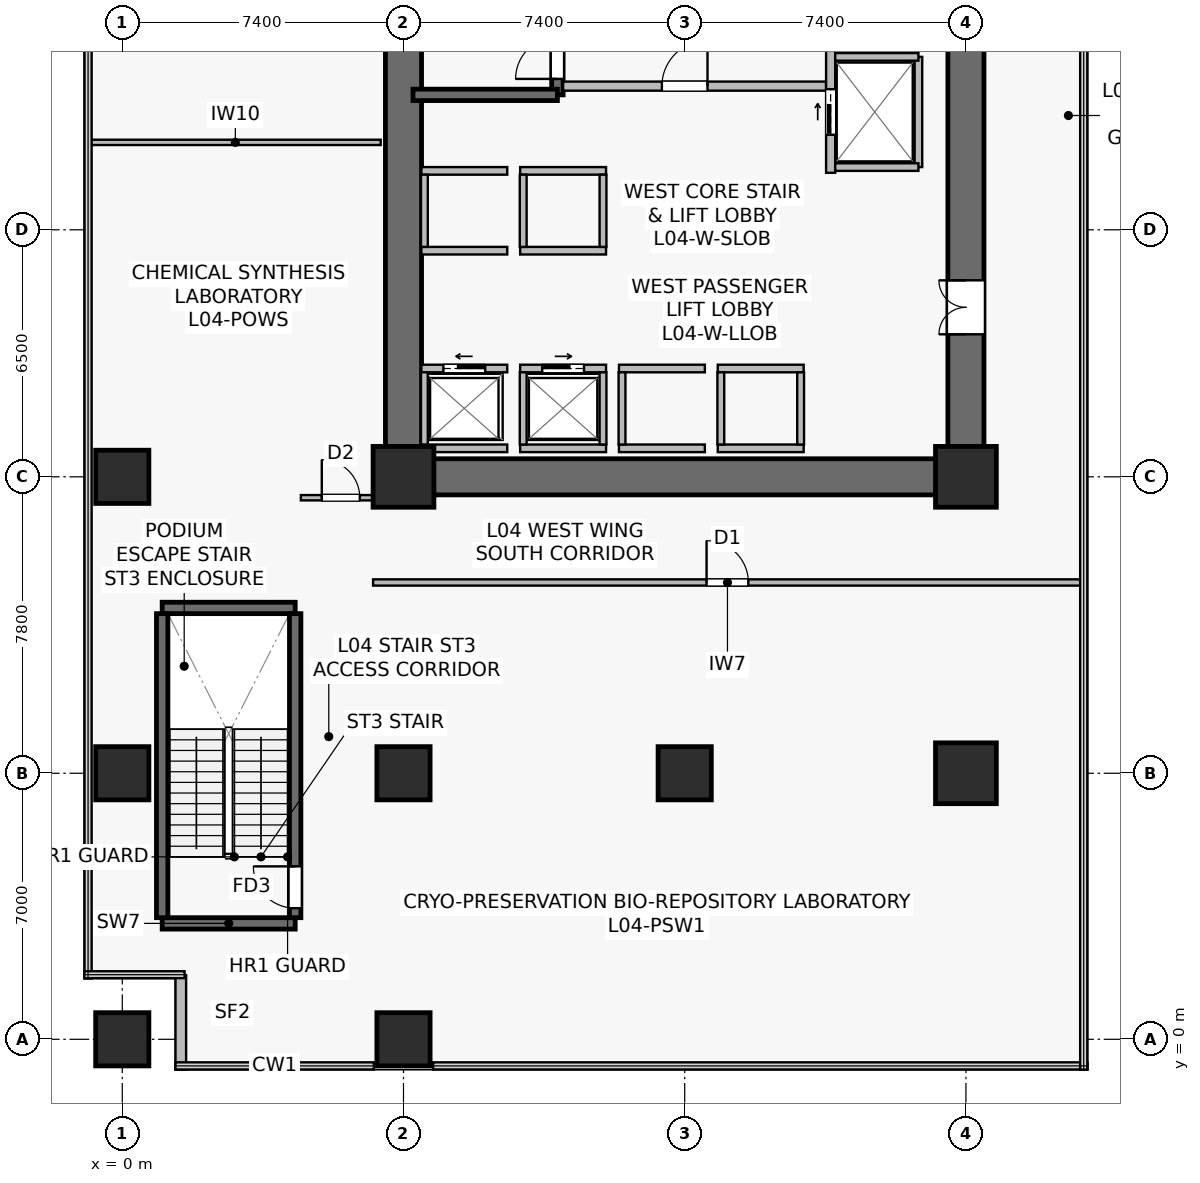
"""IFC4 building model, lengths in metres.
Left out: names, types, materials, properties, quantities, classifications, styles, units other than length and angle.
Written with IfcOpenShell. Run it as: python <this file> out.ifc"""

import sys

from ifc_helpers import new_model, si_unit, direction, frame, frame_2d, origin, origin_2d, place, context, subcontext, project, spatial, rectangle, extrude, source, transform, mapped, element, fill, save


model = new_model("IFC4")
c1 = context("Model", 3, precision=1e-05, world=origin(), true_north=direction((0.0, 1.0)))
c2 = subcontext(c1, "Body", "Model", "MODEL_VIEW")
j1 = project(units=[si_unit("LENGTHUNIT", "METRE"), si_unit("PLANEANGLEUNIT", "RADIAN")], contexts=[c1])
p1 = place(None, origin())
s1 = spatial("IfcSite", under=j1, at=p1, CompositionType="ELEMENT")
p2 = place(p1, origin())
s2 = spatial("IfcBuilding", under=s1, at=p2, CompositionType="ELEMENT")
p3 = place(p2, frame((0.0, 0.0, 15.0)))
s3 = spatial("IfcBuildingStorey", under=s2, at=p3, CompositionType="ELEMENT", Elevation=15.0)
p4 = place(p3, frame((6.925, 14.8, 0.0), z_axis=(0.0, 0.0, 1.0), x_axis=(1.0, 0.0, 0.0)))
e1 = element("IfcWall", 1, at=p4, inside=s3, PredefinedType="SHEAR", context=c2, shape_type="SweptSolid", body=[
    extrude(rectangle(XDim=15.75, YDim=0.95, at=frame_2d((7.875, 0.0))), origin(), (0.0, 0.0, 1.0), 4.45),
])
p5 = place(p3, frame((7.4, 15.275, 0.0), z_axis=(0.0, 0.0, 1.0), x_axis=(0.0, 1.0, 0.0)))
e2 = element("IfcWall", 2, at=p5, inside=s3, PredefinedType="SHEAR", context=c2, shape_type="SweptSolid", body=[
    extrude(rectangle(XDim=18.05, YDim=0.95, at=frame_2d((9.025, 0.0))), origin(), (0.0, 0.0, 1.0), 4.45),
])
p6 = place(p3, frame((22.2, 15.275, 0.0), z_axis=(0.0, 0.0, 1.0), x_axis=(0.0, 1.0, 0.0)))
e3 = element("IfcWall", 3, at=p6, inside=s3, PredefinedType="SHEAR", context=c2, shape_type="SweptSolid", body=[
    extrude(rectangle(XDim=18.05, YDim=0.95, at=frame_2d((9.025, 0.0))), origin(), (0.0, 0.0, 1.0), 4.45),
])
p7 = place(p6, frame((3.275, 0.0, 0.0)))
e4 = element("IfcOpeningElement", 4, at=p7, cuts=e3, PredefinedType="OPENING", context=c2, shape_type="SweptSolid", body=[
    extrude(rectangle(XDim=1.42, YDim=2.2, at=frame_2d((0.71, 1.1))), frame((0.0, 0.485, 0.0), z_axis=(0.0, -1.0, 0.0), x_axis=(1.0, 0.0, 0.0)), (0.0, 0.0, 1.0), 0.97),
])
p8 = place(p3, frame((11.45, 24.85, 0.0), z_axis=(0.0, 0.0, 1.0), x_axis=(0.0, 1.0, 0.0)))
e5 = element("IfcWall", 5, at=p8, inside=s3, PredefinedType="SHEAR", context=c2, shape_type="SweptSolid", body=[
    extrude(rectangle(XDim=8.63, YDim=0.3, at=frame_2d((4.315, 0.0))), origin(), (0.0, 0.0, 1.0), 4.45),
])
p9 = place(p8, frame((0.42, 0.0, 0.0)))
e6 = element("IfcOpeningElement", 6, at=p9, cuts=e5, PredefinedType="OPENING", context=c2, shape_type="SweptSolid", body=[
    extrude(rectangle(XDim=1.1, YDim=2.15, at=frame_2d((0.55, 1.075))), frame((0.0, 0.16, 0.0), z_axis=(0.0, -1.0, 0.0), x_axis=(1.0, 0.0, 0.0)), (0.0, 0.0, 1.0), 0.32),
])
p10 = place(p3, frame((7.65, 24.85, 0.0), z_axis=(0.0, 0.0, 1.0), x_axis=(1.0, 0.0, 0.0)))
e7 = element("IfcWall", 7, at=p10, inside=s3, PredefinedType="SHEAR", context=c2, shape_type="SweptSolid", body=[
    extrude(rectangle(XDim=3.8, YDim=0.3, at=frame_2d((1.9, 0.0))), origin(), (0.0, 0.0, 1.0), 4.45),
])
for number, where, z_axis, x_axis in (
    (8, (1.05, 3.05, 0.0), (0.0, 0.0, 1.0), (1.0, 0.0, 0.0)),
    (9, (1.05, 11.35, 0.0), (0.0, 0.0, 1.0), (1.0, 0.0, 0.0)),
):
    element("IfcWall", number, at=place(p3, frame(where, z_axis=z_axis, x_axis=x_axis)), inside=s3, PredefinedType="SHEAR", context=c2, shape_type="SweptSolid", body=[
        extrude(rectangle(XDim=3.5, YDim=0.3, at=frame_2d((1.75, 0.0))), origin(), (0.0, 0.0, 1.0), 4.45),
    ])
p11 = place(p3, frame((1.05, 3.2, 0.0), z_axis=(0.0, 0.0, 1.0), x_axis=(0.0, 1.0, 0.0)))
e10 = element("IfcWall", 10, at=p11, inside=s3, PredefinedType="SHEAR", context=c2, shape_type="SweptSolid", body=[
    extrude(rectangle(XDim=8.0, YDim=0.3, at=frame_2d((4.0, 0.0))), origin(), (0.0, 0.0, 1.0), 4.45),
])
p12 = place(p3, frame((4.55, 3.2, 0.0), z_axis=(0.0, 0.0, 1.0), x_axis=(0.0, 1.0, 0.0)))
e11 = element("IfcWall", 11, at=p12, inside=s3, PredefinedType="SHEAR", context=c2, shape_type="SweptSolid", body=[
    extrude(rectangle(XDim=8.0, YDim=0.3, at=frame_2d((4.0, 0.0))), origin(), (0.0, 0.0, 1.0), 4.45),
])
p13 = place(p12, frame((0.25, 0.0, 0.0)))
e12 = element("IfcOpeningElement", 12, at=p13, cuts=e11, PredefinedType="OPENING", context=c2, shape_type="SweptSolid", body=[
    extrude(rectangle(XDim=1.1, YDim=2.15, at=frame_2d((0.55, 1.075))), frame((0.0, 0.16, 0.0), z_axis=(0.0, -1.0, 0.0), x_axis=(1.0, 0.0, 0.0)), (0.0, 0.0, 1.0), 0.32),
])
m1 = source(origin(), c2, "Body", "SweptSolid", [
    extrude(rectangle(XDim=1.4, YDim=1.4, at=origin_2d()), origin(), (0.0, 0.0, 1.0), 4.8),
])
p14 = place(p3, frame((14.8, 7.0, 0.0), z_axis=(0.0, 0.0, 1.0), x_axis=(1.0, 0.0, 0.0)))
e13 = element("IfcColumn", 13, at=p14, inside=s3, PredefinedType="COLUMN", context=c2, shape_type="MappedRepresentation", body=[
    mapped(m1, transform((0.0, 0.0, 0.0), scale=1.0)),
])
m2 = source(origin(), c2, "Body", "SweptSolid", [
    extrude(rectangle(XDim=1.6, YDim=1.6, at=origin_2d()), origin(), (0.0, 0.0, 1.0), 4.8),
])
for number, where, z_axis, x_axis in (
    (14, (22.2, 7.0, 0.0), (0.0, 0.0, 1.0), (1.0, 0.0, 0.0)),
    (15, (7.4, 14.8, 0.0), (0.0, 0.0, 1.0), (1.0, 0.0, 0.0)),
    (16, (22.2, 14.8, 0.0), (0.0, 0.0, 1.0), (1.0, 0.0, 0.0)),
):
    element("IfcColumn", number, at=place(p3, frame(where, z_axis=z_axis, x_axis=x_axis)), inside=s3, PredefinedType="COLUMN", context=c2, shape_type="MappedRepresentation", body=[
        mapped(m2, transform((0.0, 0.0, 0.0), scale=1.0)),
    ])
for number, where, z_axis, x_axis in (
    (17, (7.4, 7.0, 0.0), (0.0, 0.0, 1.0), (1.0, 0.0, 0.0)),
    (18, (0.0, 7.0, 0.0), (0.0, 0.0, 1.0), (1.0, 0.0, 0.0)),
    (19, (0.0, 14.8, 0.0), (0.0, 0.0, 1.0), (1.0, 0.0, 0.0)),
    (20, (0.0, 0.0, 0.0), (0.0, 0.0, 1.0), (1.0, 0.0, 0.0)),
    (21, (7.4, 0.0, 0.0), (0.0, 0.0, 1.0), (1.0, 0.0, 0.0)),
):
    element("IfcColumn", number, at=place(p3, frame(where, z_axis=z_axis, x_axis=x_axis)), inside=s3, PredefinedType="COLUMN", context=c2, shape_type="MappedRepresentation", body=[
        mapped(m1, transform((0.0, 0.0, 0.0), scale=1.0)),
    ])
p15 = place(p3, frame((1.54, 1.688, 0.0), z_axis=(0.0, 0.0, 1.0), x_axis=(0.0, -1.0, 0.0)))
e22 = element("IfcWall", 22, at=p15, inside=s3, PredefinedType="STANDARD", context=c2, shape_type="SweptSolid", body=[
    extrude(rectangle(XDim=2.488, YDim=0.28, at=frame_2d((1.244, 0.0))), origin(), (0.0, 0.0, 1.0), 4.45),
])
p16 = place(p3, frame((11.6, 25.08, 0.0), z_axis=(0.0, 0.0, 1.0), x_axis=(1.0, 0.0, 0.0)))
e23 = element("IfcWall", 23, at=p16, inside=s3, PredefinedType="SOLIDWALL", context=c2, shape_type="SweptSolid", body=[
    extrude(rectangle(XDim=6.92, YDim=0.24, at=frame_2d((3.46, 0.0))), origin(), (0.0, 0.0, 1.0), 3.735),
])
p17 = place(p16, frame((2.6, 0.0, 0.0)))
e24 = element("IfcOpeningElement", 24, at=p17, cuts=e23, PredefinedType="OPENING", context=c2, shape_type="SweptSolid", body=[
    extrude(rectangle(XDim=1.2, YDim=2.16, at=frame_2d((0.6, 1.08))), frame((0.0, 0.13, 0.0), z_axis=(0.0, -1.0, 0.0), x_axis=(1.0, 0.0, 0.0)), (0.0, 0.0, 1.0), 0.26),
])
p18 = place(p3, frame((18.64, 22.8, 0.0), z_axis=(0.0, 0.0, 1.0), x_axis=(0.0, 1.0, 0.0)))
e25 = element("IfcWall", 25, at=p18, inside=s3, PredefinedType="SOLIDWALL", context=c2, shape_type="SweptSolid", body=[
    extrude(rectangle(XDim=6.85, YDim=0.24, at=frame_2d((3.425, 0.0))), origin(), (0.0, 0.0, 1.0), 3.535),
])
p19 = place(p18, frame((4.85, 0.0, 0.0)))
e26 = element("IfcOpeningElement", 26, at=p19, cuts=e25, PredefinedType="OPENING", context=c2, shape_type="SweptSolid", body=[
    extrude(rectangle(XDim=1.1, YDim=2.22, at=frame_2d((0.55, 1.11))), frame((0.0, 0.13, 0.0), z_axis=(0.0, -1.0, 0.0), x_axis=(1.0, 0.0, 0.0)), (0.0, 0.0, 1.0), 0.26),
])
p20 = place(p18, frame((1.0, 0.0, 0.0)))
e27 = element("IfcOpeningElement", 27, at=p20, cuts=e25, PredefinedType="OPENING", context=c2, shape_type="SweptSolid", body=[
    extrude(rectangle(XDim=1.2, YDim=2.22, at=frame_2d((0.6, 1.11))), frame((0.0, 0.13, 0.0), z_axis=(0.0, -1.0, 0.0), x_axis=(1.0, 0.0, 0.0)), (0.0, 0.0, 1.0), 0.26),
])
p21 = place(p3, frame((7.87, 17.65, 0.0), z_axis=(0.0, 0.0, 1.0), x_axis=(1.0, 0.0, 0.0)))
e28 = element("IfcWall", 28, at=p21, inside=s3, PredefinedType="SOLIDWALL", context=c2, shape_type="SweptSolid", body=[
    extrude(rectangle(XDim=2.26, YDim=0.2, at=frame_2d((1.13, 0.0))), origin(), (0.0, 0.0, 1.0), 4.45),
])
p22 = place(p21, frame((0.58, 0.0, 0.0)))
e29 = element("IfcOpeningElement", 29, at=p22, cuts=e28, PredefinedType="OPENING", context=c2, shape_type="SweptSolid", body=[
    extrude(rectangle(XDim=1.1, YDim=2.22, at=frame_2d((0.55, 1.11))), frame((0.0, 0.11, 0.0), z_axis=(0.0, -1.0, 0.0), x_axis=(1.0, 0.0, 0.0)), (0.0, 0.0, 1.0), 0.22),
])
p23 = place(p3, frame((7.87, 15.55, 0.0), z_axis=(0.0, 0.0, 1.0), x_axis=(1.0, 0.0, 0.0)))
e30 = element("IfcWall", 30, at=p23, inside=s3, PredefinedType="SOLIDWALL", context=c2, shape_type="SweptSolid", body=[
    extrude(rectangle(XDim=2.26, YDim=0.2, at=frame_2d((1.13, 0.0))), origin(), (0.0, 0.0, 1.0), 4.45),
])
p24 = place(p3, frame((7.95, 15.65, 0.0), z_axis=(0.0, 0.0, 1.0), x_axis=(0.0, 1.0, 0.0)))
e31 = element("IfcWall", 31, at=p24, inside=s3, PredefinedType="SOLIDWALL", context=c2, shape_type="SweptSolid", body=[
    extrude(rectangle(XDim=1.9, YDim=0.18, at=frame_2d((0.95, 0.0))), origin(), (0.0, 0.0, 1.0), 4.45),
])
p25 = place(p3, frame((10.47, 17.65, 0.0), z_axis=(0.0, 0.0, 1.0), x_axis=(1.0, 0.0, 0.0)))
e32 = element("IfcWall", 32, at=p25, inside=s3, PredefinedType="SOLIDWALL", context=c2, shape_type="SweptSolid", body=[
    extrude(rectangle(XDim=2.26, YDim=0.2, at=frame_2d((1.13, 0.0))), origin(), (0.0, 0.0, 1.0), 4.45),
])
p26 = place(p25, frame((0.58, 0.0, 0.0)))
e33 = element("IfcOpeningElement", 33, at=p26, cuts=e32, PredefinedType="OPENING", context=c2, shape_type="SweptSolid", body=[
    extrude(rectangle(XDim=1.1, YDim=2.22, at=frame_2d((0.55, 1.11))), frame((0.0, 0.11, 0.0), z_axis=(0.0, -1.0, 0.0), x_axis=(1.0, 0.0, 0.0)), (0.0, 0.0, 1.0), 0.22),
])
p27 = place(p3, frame((10.47, 15.55, 0.0), z_axis=(0.0, 0.0, 1.0), x_axis=(1.0, 0.0, 0.0)))
e34 = element("IfcWall", 34, at=p27, inside=s3, PredefinedType="SOLIDWALL", context=c2, shape_type="SweptSolid", body=[
    extrude(rectangle(XDim=2.26, YDim=0.2, at=frame_2d((1.13, 0.0))), origin(), (0.0, 0.0, 1.0), 4.45),
])
for number, where, z_axis, x_axis in (
    (35, (10.55, 15.65, 0.0), (0.0, 0.0, 1.0), (0.0, 1.0, 0.0)),
    (36, (12.65, 15.65, 0.0), (0.0, 0.0, 1.0), (0.0, 1.0, 0.0)),
):
    element("IfcWall", number, at=place(p3, frame(where, z_axis=z_axis, x_axis=x_axis)), inside=s3, PredefinedType="SOLIDWALL", context=c2, shape_type="SweptSolid", body=[
        extrude(rectangle(XDim=1.9, YDim=0.18, at=frame_2d((0.95, 0.0))), origin(), (0.0, 0.0, 1.0), 4.45),
    ])
for number, where, z_axis, x_axis in (
    (37, (13.07, 17.65, 0.0), (0.0, 0.0, 1.0), (1.0, 0.0, 0.0)),
    (38, (13.07, 15.55, 0.0), (0.0, 0.0, 1.0), (1.0, 0.0, 0.0)),
):
    element("IfcWall", number, at=place(p3, frame(where, z_axis=z_axis, x_axis=x_axis)), inside=s3, PredefinedType="SOLIDWALL", context=c2, shape_type="SweptSolid", body=[
        extrude(rectangle(XDim=2.26, YDim=0.2, at=frame_2d((1.13, 0.0))), origin(), (0.0, 0.0, 1.0), 3.735),
    ])
p28 = place(p3, frame((13.15, 15.65, 0.0), z_axis=(0.0, 0.0, 1.0), x_axis=(0.0, 1.0, 0.0)))
e39 = element("IfcWall", 39, at=p28, inside=s3, PredefinedType="SOLIDWALL", context=c2, shape_type="SweptSolid", body=[
    extrude(rectangle(XDim=1.9, YDim=0.18, at=frame_2d((0.95, 0.0))), origin(), (0.0, 0.0, 1.0), 4.45),
])
for number, where, z_axis, x_axis in (
    (40, (15.67, 17.65, 0.0), (0.0, 0.0, 1.0), (1.0, 0.0, 0.0)),
    (41, (15.67, 15.55, 0.0), (0.0, 0.0, 1.0), (1.0, 0.0, 0.0)),
):
    element("IfcWall", number, at=place(p3, frame(where, z_axis=z_axis, x_axis=x_axis)), inside=s3, PredefinedType="SOLIDWALL", context=c2, shape_type="SweptSolid", body=[
        extrude(rectangle(XDim=2.26, YDim=0.2, at=frame_2d((1.13, 0.0))), origin(), (0.0, 0.0, 1.0), 4.45),
    ])
for number, where, z_axis, x_axis in (
    (42, (15.75, 15.65, 0.0), (0.0, 0.0, 1.0), (0.0, 1.0, 0.0)),
    (43, (17.85, 15.65, 0.0), (0.0, 0.0, 1.0), (0.0, 1.0, 0.0)),
):
    element("IfcWall", number, at=place(p3, frame(where, z_axis=z_axis, x_axis=x_axis)), inside=s3, PredefinedType="SOLIDWALL", context=c2, shape_type="SweptSolid", body=[
        extrude(rectangle(XDim=1.9, YDim=0.18, at=frame_2d((0.95, 0.0))), origin(), (0.0, 0.0, 1.0), 4.45),
    ])
for number, where, z_axis, x_axis in (
    (44, (7.87, 20.75, 0.0), (0.0, 0.0, 1.0), (1.0, 0.0, 0.0)),
    (45, (7.87, 22.85, 0.0), (0.0, 0.0, 1.0), (1.0, 0.0, 0.0)),
):
    element("IfcWall", number, at=place(p3, frame(where, z_axis=z_axis, x_axis=x_axis)), inside=s3, PredefinedType="SOLIDWALL", context=c2, shape_type="SweptSolid", body=[
        extrude(rectangle(XDim=2.26, YDim=0.2, at=frame_2d((1.13, 0.0))), origin(), (0.0, 0.0, 1.0), 4.45),
    ])
p29 = place(p3, frame((7.95, 20.85, 0.0), z_axis=(0.0, 0.0, 1.0), x_axis=(0.0, 1.0, 0.0)))
e46 = element("IfcWall", 46, at=p29, inside=s3, PredefinedType="SOLIDWALL", context=c2, shape_type="SweptSolid", body=[
    extrude(rectangle(XDim=1.9, YDim=0.18, at=frame_2d((0.95, 0.0))), origin(), (0.0, 0.0, 1.0), 4.45),
])
for number, where, z_axis, x_axis in (
    (47, (10.47, 20.75, 0.0), (0.0, 0.0, 1.0), (1.0, 0.0, 0.0)),
    (48, (10.47, 22.85, 0.0), (0.0, 0.0, 1.0), (1.0, 0.0, 0.0)),
):
    element("IfcWall", number, at=place(p3, frame(where, z_axis=z_axis, x_axis=x_axis)), inside=s3, PredefinedType="SOLIDWALL", context=c2, shape_type="SweptSolid", body=[
        extrude(rectangle(XDim=2.26, YDim=0.2, at=frame_2d((1.13, 0.0))), origin(), (0.0, 0.0, 1.0), 4.45),
    ])
for number, where, z_axis, x_axis in (
    (49, (10.55, 20.85, 0.0), (0.0, 0.0, 1.0), (0.0, 1.0, 0.0)),
    (50, (12.65, 20.85, 0.0), (0.0, 0.0, 1.0), (0.0, 1.0, 0.0)),
):
    element("IfcWall", number, at=place(p3, frame(where, z_axis=z_axis, x_axis=x_axis)), inside=s3, PredefinedType="SOLIDWALL", context=c2, shape_type="SweptSolid", body=[
        extrude(rectangle(XDim=1.9, YDim=0.18, at=frame_2d((0.95, 0.0))), origin(), (0.0, 0.0, 1.0), 4.45),
    ])
p30 = place(p3, frame((20.95, 22.95, 0.0), z_axis=(0.0, 0.0, 1.0), x_axis=(0.0, 1.0, 0.0)))
e51 = element("IfcWall", 51, at=p30, inside=s3, PredefinedType="SOLIDWALL", context=c2, shape_type="SweptSolid", body=[
    extrude(rectangle(XDim=2.9, YDim=0.2, at=frame_2d((1.45, 0.0))), origin(), (0.0, 0.0, 1.0), 3.535),
])
for number, where, z_axis, x_axis in (
    (52, (18.76, 25.85, 0.0), (0.0, 0.0, 1.0), (1.0, 0.0, 0.0)),
    (53, (18.76, 22.95, 0.0), (0.0, 0.0, 1.0), (1.0, 0.0, 0.0)),
):
    element("IfcWall", number, at=place(p3, frame(where, z_axis=z_axis, x_axis=x_axis)), inside=s3, PredefinedType="SOLIDWALL", context=c2, shape_type="SweptSolid", body=[
        extrude(rectangle(XDim=2.19, YDim=0.2, at=frame_2d((1.095, 0.0))), origin(), (0.0, 0.0, 1.0), 4.45),
    ])
p31 = place(p3, frame((-0.85, 23.6, 0.0), z_axis=(0.0, 0.0, 1.0), x_axis=(1.0, 0.0, 0.0)))
e54 = element("IfcWall", 54, at=p31, inside=s3, PredefinedType="PARTITIONING", context=c2, shape_type="SweptSolid", body=[
    extrude(rectangle(XDim=7.65, YDim=0.14, at=frame_2d((3.825, 0.0))), origin(), (0.0, 0.0, 1.0), 3.835),
])
p32 = place(p3, frame((4.7, 14.25, 0.0), z_axis=(0.0, 0.0, 1.0), x_axis=(1.0, 0.0, 0.0)))
e55 = element("IfcWall", 55, at=p32, inside=s3, PredefinedType="PARTITIONING", context=c2, shape_type="SweptSolid", body=[
    extrude(rectangle(XDim=2.1, YDim=0.14, at=frame_2d((1.05, 0.0))), origin(), (0.0, 0.0, 1.0), 4.45),
])
p33 = place(p32, frame((0.55, 0.0, 0.0)))
e56 = element("IfcOpeningElement", 56, at=p33, cuts=e55, PredefinedType="OPENING", context=c2, shape_type="SweptSolid", body=[
    extrude(rectangle(XDim=1.0, YDim=2.15, at=frame_2d((0.5, 1.075))), frame((0.0, 0.08, 0.0), z_axis=(0.0, -1.0, 0.0), x_axis=(1.0, 0.0, 0.0)), (0.0, 0.0, 1.0), 0.16),
])
p34 = place(p3, frame((6.6, 12.02, 0.0), z_axis=(0.0, 0.0, 1.0), x_axis=(1.0, 0.0, 0.0)))
e57 = element("IfcWall", 57, at=p34, inside=s3, PredefinedType="PARTITIONING", context=c2, shape_type="SweptSolid", body=[
    extrude(rectangle(XDim=18.65, YDim=0.165, at=frame_2d((9.325, 0.0))), origin(), (0.0, 0.0, 1.0), 3.735),
])
p35 = place(p34, frame((8.775, 0.0, 0.0)))
e58 = element("IfcOpeningElement", 58, at=p35, cuts=e57, PredefinedType="OPENING", context=c2, shape_type="SweptSolid", body=[
    extrude(rectangle(XDim=1.1, YDim=2.18, at=frame_2d((0.55, 1.09))), frame((0.0, 0.093, 0.0), z_axis=(0.0, -1.0, 0.0), x_axis=(1.0, 0.0, 0.0)), (0.0, 0.0, 1.0), 0.185),
])
m3 = source(origin(), c2, "Body", "SweptSolid", [
    extrude(rectangle(XDim=1.1, YDim=2.15, at=frame_2d((0.55, 1.075))), frame((0.0, 0.025, 0.0), z_axis=(0.0, -1.0, 0.0), x_axis=(1.0, 0.0, 0.0)), (0.0, 0.0, 1.0), 0.05),
])
p36 = place(p9, origin())
e59 = element("IfcDoor", 59, at=p36, inside=s3, OperationType="SINGLE_SWING_LEFT", PredefinedType="DOOR", context=c2, shape_type="MappedRepresentation", body=[
    mapped(m3, transform((0.0, 0.0, 0.0), scale=1.0)),
])
fill(e6, e59)
m4 = source(origin(), c2, "Body", "SweptSolid", [
    extrude(rectangle(XDim=1.2, YDim=2.16, at=frame_2d((0.6, 1.08))), frame((0.0, 0.025, 0.0), z_axis=(0.0, -1.0, 0.0), x_axis=(1.0, 0.0, 0.0)), (0.0, 0.0, 1.0), 0.05),
])
p37 = place(p17, origin())
e60 = element("IfcDoor", 60, at=p37, inside=s3, OperationType="SINGLE_SWING_RIGHT", PredefinedType="DOOR", context=c2, shape_type="MappedRepresentation", body=[
    mapped(m4, transform((0.0, 0.0, 0.0), scale=1.0)),
])
fill(e24, e60)
m5 = source(origin(), c2, "Body", "SweptSolid", [
    extrude(rectangle(XDim=1.1, YDim=2.22, at=frame_2d((0.55, 1.11))), frame((0.0, 0.025, 0.0), z_axis=(0.0, -1.0, 0.0), x_axis=(1.0, 0.0, 0.0)), (0.0, 0.0, 1.0), 0.05),
])
p38 = place(p22, origin())
e61 = element("IfcDoor", 61, at=p38, inside=s3, OperationType="SLIDING_TO_LEFT", PredefinedType="USERDEFINED", context=c2, shape_type="MappedRepresentation", body=[
    mapped(m5, transform((0.0, 0.0, 0.0), scale=1.0)),
])
fill(e29, e61)
p39 = place(p26, origin())
e62 = element("IfcDoor", 62, at=p39, inside=s3, OperationType="SLIDING_TO_RIGHT", PredefinedType="USERDEFINED", context=c2, shape_type="MappedRepresentation", body=[
    mapped(m5, transform((0.0, 0.0, 0.0), scale=1.0)),
])
fill(e33, e62)
m6 = source(origin(), c2, "Body", "SweptSolid", [
    extrude(rectangle(XDim=1.2, YDim=2.22, at=frame_2d((0.6, 1.11))), frame((0.0, 0.025, 0.0), z_axis=(0.0, -1.0, 0.0), x_axis=(1.0, 0.0, 0.0)), (0.0, 0.0, 1.0), 0.05),
])
p40 = place(p20, origin())
e63 = element("IfcDoor", 63, at=p40, inside=s3, OperationType="SLIDING_TO_RIGHT", PredefinedType="USERDEFINED", context=c2, shape_type="MappedRepresentation", body=[
    mapped(m6, transform((0.0, 0.0, 0.0), scale=1.0)),
])
fill(e27, e63)
m7 = source(origin(), c2, "Body", "SweptSolid", [
    extrude(rectangle(XDim=1.42, YDim=2.2, at=frame_2d((0.71, 1.1))), frame((0.0, 0.025, 0.0), z_axis=(0.0, -1.0, 0.0), x_axis=(1.0, 0.0, 0.0)), (0.0, 0.0, 1.0), 0.05),
])
p41 = place(p7, origin())
e64 = element("IfcDoor", 64, at=p41, inside=s3, OperationType="DOUBLE_DOOR_SINGLE_SWING", PredefinedType="DOOR", context=c2, shape_type="MappedRepresentation", body=[
    mapped(m7, transform((0.0, 0.0, 0.0), scale=1.0)),
])
fill(e4, e64)
p42 = place(p13, origin())
e65 = element("IfcDoor", 65, at=p42, inside=s3, OperationType="SINGLE_SWING_RIGHT", PredefinedType="DOOR", context=c2, shape_type="MappedRepresentation", body=[
    mapped(m3, transform((0.0, 0.0, 0.0), scale=1.0)),
])
fill(e12, e65)
m8 = source(origin(), c2, "Body", "SweptSolid", [
    extrude(rectangle(XDim=1.0, YDim=2.15, at=frame_2d((0.5, 1.075))), frame((0.0, 0.025, 0.0), z_axis=(0.0, -1.0, 0.0), x_axis=(1.0, 0.0, 0.0)), (0.0, 0.0, 1.0), 0.05),
])
p43 = place(p33, origin())
e66 = element("IfcDoor", 66, at=p43, inside=s3, OperationType="SINGLE_SWING_LEFT", PredefinedType="DOOR", context=c2, shape_type="MappedRepresentation", body=[
    mapped(m8, transform((0.0, 0.0, 0.0), scale=1.0)),
])
fill(e56, e66)
m9 = source(origin(), c2, "Body", "SweptSolid", [
    extrude(rectangle(XDim=1.1, YDim=2.18, at=frame_2d((0.55, 1.09))), frame((0.0, 0.025, 0.0), z_axis=(0.0, -1.0, 0.0), x_axis=(1.0, 0.0, 0.0)), (0.0, 0.0, 1.0), 0.05),
])
p44 = place(p35, origin())
e67 = element("IfcDoor", 67, at=p44, inside=s3, OperationType="SINGLE_SWING_LEFT", PredefinedType="DOOR", context=c2, shape_type="MappedRepresentation", body=[
    mapped(m9, transform((0.0, 0.0, 0.0), scale=1.0)),
])
fill(e58, e67)
save(model, sys.argv[1])
